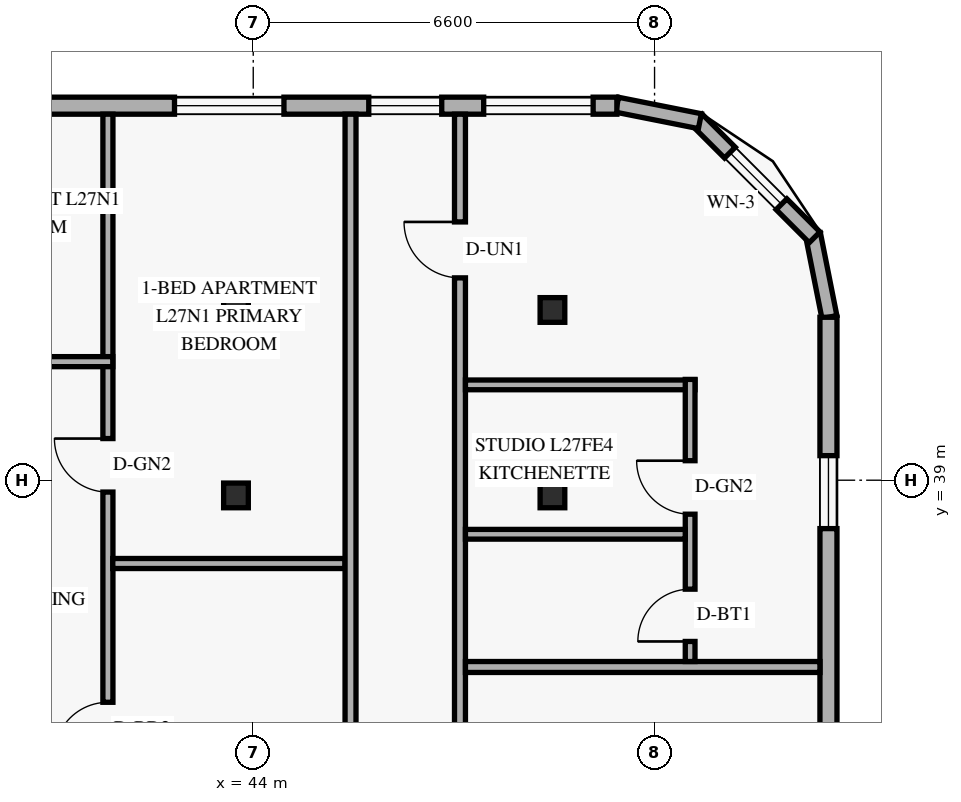
"""IFC4 building model, lengths in metres.
Left out: names, types, materials, properties, quantities, classifications, styles, units other than length and angle.
Written with IfcOpenShell. Run it as: python <this file> out.ifc"""

import sys

from ifc_helpers import new_model, si_unit, direction, frame, frame_2d, origin, origin_2d, place, context, subcontext, project, spatial, rectangle, hollow_rectangle, extrude, element, fill, save


model = new_model("IFC4")
c1 = context("Model", 3, precision=1e-05, world=origin(), true_north=direction((0.0, 1.0)))
c2 = subcontext(c1, "Body", "Model", "MODEL_VIEW")
j1 = project(units=[si_unit("LENGTHUNIT", "METRE"), si_unit("PLANEANGLEUNIT", "RADIAN")], contexts=[c1])
p1 = place(None, origin())
s1 = spatial("IfcSite", under=j1, at=p1, CompositionType="ELEMENT")
p2 = place(p1, origin())
s2 = spatial("IfcBuilding", under=s1, at=p2, CompositionType="ELEMENT")
p3 = place(p2, frame((0.0, 0.0, 106.2)))
s3 = spatial("IfcBuildingStorey", under=s2, at=p3, CompositionType="ELEMENT", Elevation=106.2)
for number, where, z_axis, x_axis in (
    (1, (43.653, 38.75, 0.0), (0.035, 0.0, 0.999), (0.0, 1.0, 0.0)),
    (2, (43.653, 41.8, 0.0), (0.035, 0.0, 0.999), (0.0, 1.0, 0.0)),
):
    element("IfcColumn", number, at=place(p3, frame(where, z_axis=z_axis, x_axis=x_axis)), inside=s3, PredefinedType="COLUMN", context=c2, shape_type="SweptSolid", body=[
        extrude(hollow_rectangle(XDim=0.406, YDim=0.406, WallThickness=0.016, at=origin_2d()), origin(), (0.0, 0.0, 1.0), 3.602),
    ])
for number, where, z_axis, x_axis in (
    (3, (48.816, 38.75, 0.0), (0.058, 0.0, 0.998), (0.0, 1.0, 0.0)),
    (4, (48.816, 41.8, 0.0), (0.058, 0.0, 0.998), (0.0, 1.0, 0.0)),
):
    element("IfcColumn", number, at=place(p3, frame(where, z_axis=z_axis, x_axis=x_axis)), inside=s3, PredefinedType="COLUMN", context=c2, shape_type="SweptSolid", body=[
        extrude(hollow_rectangle(XDim=0.406, YDim=0.406, WallThickness=0.016, at=origin_2d()), origin(), (0.0, 0.0, 1.0), 3.606),
    ])
p4 = place(p3, frame((53.476, 41.684, 0.0), z_axis=(0.0, 0.0, 1.0), x_axis=(-0.195000137217, 0.980803214965, 0.0)))
e5 = element("IfcWall", 5, at=p4, inside=s3, PredefinedType="SOLIDWALL", context=c2, shape_type="SweptSolid", body=[
    extrude(rectangle(XDim=1.388, YDim=0.25, at=frame_2d((0.694, 0.0))), origin(), (0.0, 0.0, 1.0), 3.36),
])
p5 = place(p3, frame((53.232, 42.995, 0.0), z_axis=(0.0, 0.0, 1.0), x_axis=(-0.707151344399, 0.707062215165, 0.0)))
e6 = element("IfcWall", 6, at=p5, inside=s3, PredefinedType="SOLIDWALL", context=c2, shape_type="SweptSolid", body=[
    extrude(rectangle(XDim=2.739, YDim=0.25, at=frame_2d((1.37, 0.0))), origin(), (0.0, 0.0, 1.0), 3.36),
])
p6 = place(p5, frame((0.77, 0.0, 0.85)))
e7 = element("IfcOpeningElement", 7, at=p6, cuts=e6, PredefinedType="OPENING", context=c2, shape_type="SweptSolid", body=[
    extrude(rectangle(XDim=1.2, YDim=1.5, at=frame_2d((0.6, 0.75))), frame((0.0, 0.135, 0.0), z_axis=(0.0, -1.0, 0.0), x_axis=(1.0, 0.0, 0.0)), (0.0, 0.0, 1.0), 0.27),
])
p7 = place(p3, frame((51.345, 44.905, 0.0), z_axis=(0.0, 0.0, 1.0), x_axis=(-0.980809899341, 0.19496651342, 0.0)))
e8 = element("IfcWall", 8, at=p7, inside=s3, PredefinedType="SOLIDWALL", context=c2, shape_type="SweptSolid", body=[
    extrude(rectangle(XDim=1.389, YDim=0.25, at=frame_2d((0.694, 0.0))), origin(), (0.0, 0.0, 1.0), 3.36),
])
p8 = place(p3, frame((53.46, 6.32, 0.0), z_axis=(0.0, 0.0, 1.0), x_axis=(0.0, 1.0, 0.0)))
e9 = element("IfcWall", 9, at=p8, inside=s3, PredefinedType="SOLIDWALL", context=c2, shape_type="SweptSolid", body=[
    extrude(rectangle(XDim=35.36, YDim=0.28, at=frame_2d((17.68, 0.0))), origin(), (0.0, 0.0, 1.0), 3.36),
])
p9 = place(p8, frame((3.128, 0.0, 0.85)))
e10 = element("IfcOpeningElement", 10, at=p9, cuts=e9, PredefinedType="OPENING", context=c2, shape_type="SweptSolid", body=[
    extrude(rectangle(XDim=1.2, YDim=1.5, at=frame_2d((0.6, 0.75))), frame((0.0, 0.15, 0.0), z_axis=(0.0, -1.0, 0.0), x_axis=(1.0, 0.0, 0.0)), (0.0, 0.0, 1.0), 0.3),
])
p10 = place(p8, frame((12.82, 0.0, 0.85)))
e11 = element("IfcOpeningElement", 11, at=p10, cuts=e9, PredefinedType="OPENING", context=c2, shape_type="SweptSolid", body=[
    extrude(rectangle(XDim=1.2, YDim=1.5, at=frame_2d((0.6, 0.75))), frame((0.0, 0.15, 0.0), z_axis=(0.0, -1.0, 0.0), x_axis=(1.0, 0.0, 0.0)), (0.0, 0.0, 1.0), 0.3),
])
p11 = place(p8, frame((22.194, 0.0, 0.85)))
e12 = element("IfcOpeningElement", 12, at=p11, cuts=e9, PredefinedType="OPENING", context=c2, shape_type="SweptSolid", body=[
    extrude(rectangle(XDim=1.2, YDim=1.5, at=frame_2d((0.6, 0.75))), frame((0.0, 0.15, 0.0), z_axis=(0.0, -1.0, 0.0), x_axis=(1.0, 0.0, 0.0)), (0.0, 0.0, 1.0), 0.3),
])
p12 = place(p8, frame((27.306, 0.0, 0.85)))
e13 = element("IfcOpeningElement", 13, at=p12, cuts=e9, PredefinedType="OPENING", context=c2, shape_type="SweptSolid", body=[
    extrude(rectangle(XDim=1.2, YDim=1.5, at=frame_2d((0.6, 0.75))), frame((0.0, 0.15, 0.0), z_axis=(0.0, -1.0, 0.0), x_axis=(1.0, 0.0, 0.0)), (0.0, 0.0, 1.0), 0.3),
])
p13 = place(p8, frame((31.884, 0.0, 0.85)))
e14 = element("IfcOpeningElement", 14, at=p13, cuts=e9, PredefinedType="OPENING", context=c2, shape_type="SweptSolid", body=[
    extrude(rectangle(XDim=1.2, YDim=1.5, at=frame_2d((0.6, 0.75))), frame((0.0, 0.15, 0.0), z_axis=(0.0, -1.0, 0.0), x_axis=(1.0, 0.0, 0.0)), (0.0, 0.0, 1.0), 0.3),
])
p14 = place(p3, frame((49.98, 45.16, 0.0), z_axis=(0.0, 0.0, 1.0), x_axis=(-1.0, 0.0, 0.0)))
e15 = element("IfcWall", 15, at=p14, inside=s3, PredefinedType="SOLIDWALL", context=c2, shape_type="SweptSolid", body=[
    extrude(rectangle(XDim=36.56, YDim=0.28, at=frame_2d((18.28, 0.0))), origin(), (0.0, 0.0, 1.0), 3.36),
])
p15 = place(p14, frame((30.915, 0.0, 0.85)))
e16 = element("IfcOpeningElement", 16, at=p15, cuts=e15, PredefinedType="OPENING", context=c2, shape_type="SweptSolid", body=[
    extrude(rectangle(XDim=1.8, YDim=1.6, at=frame_2d((0.9, 0.8))), frame((0.0, 0.15, 0.0), z_axis=(0.0, -1.0, 0.0), x_axis=(1.0, 0.0, 0.0)), (0.0, 0.0, 1.0), 0.3),
])
p16 = place(p14, frame((23.055, 0.0, 0.85)))
e17 = element("IfcOpeningElement", 17, at=p16, cuts=e15, PredefinedType="OPENING", context=c2, shape_type="SweptSolid", body=[
    extrude(rectangle(XDim=1.8, YDim=1.6, at=frame_2d((0.9, 0.8))), frame((0.0, 0.15, 0.0), z_axis=(0.0, -1.0, 0.0), x_axis=(1.0, 0.0, 0.0)), (0.0, 0.0, 1.0), 0.3),
])
p17 = place(p14, frame((16.17, 0.0, 0.85)))
e18 = element("IfcOpeningElement", 18, at=p17, cuts=e15, PredefinedType="OPENING", context=c2, shape_type="SweptSolid", body=[
    extrude(rectangle(XDim=1.8, YDim=1.6, at=frame_2d((0.9, 0.8))), frame((0.0, 0.15, 0.0), z_axis=(0.0, -1.0, 0.0), x_axis=(1.0, 0.0, 0.0)), (0.0, 0.0, 1.0), 0.3),
])
p18 = place(p14, frame((10.565, 0.0, 0.85)))
e19 = element("IfcOpeningElement", 19, at=p18, cuts=e15, PredefinedType="OPENING", context=c2, shape_type="SweptSolid", body=[
    extrude(rectangle(XDim=1.8, YDim=1.6, at=frame_2d((0.9, 0.8))), frame((0.0, 0.15, 0.0), z_axis=(0.0, -1.0, 0.0), x_axis=(1.0, 0.0, 0.0)), (0.0, 0.0, 1.0), 0.3),
])
p19 = place(p14, frame((5.475, 0.0, 0.85)))
e20 = element("IfcOpeningElement", 20, at=p19, cuts=e15, PredefinedType="OPENING", context=c2, shape_type="SweptSolid", body=[
    extrude(rectangle(XDim=1.8, YDim=1.6, at=frame_2d((0.9, 0.8))), frame((0.0, 0.15, 0.0), z_axis=(0.0, -1.0, 0.0), x_axis=(1.0, 0.0, 0.0)), (0.0, 0.0, 1.0), 0.3),
])
p20 = place(p14, frame((2.88, 0.0, 0.85)))
e21 = element("IfcOpeningElement", 21, at=p20, cuts=e15, PredefinedType="OPENING", context=c2, shape_type="SweptSolid", body=[
    extrude(rectangle(XDim=1.2, YDim=1.5, at=frame_2d((0.6, 0.75))), frame((0.0, 0.15, 0.0), z_axis=(0.0, -1.0, 0.0), x_axis=(1.0, 0.0, 0.0)), (0.0, 0.0, 1.0), 0.3),
])
p21 = place(p14, frame((0.39, 0.0, 0.85)))
e22 = element("IfcOpeningElement", 22, at=p21, cuts=e15, PredefinedType="OPENING", context=c2, shape_type="SweptSolid", body=[
    extrude(rectangle(XDim=1.8, YDim=1.6, at=frame_2d((0.9, 0.8))), frame((0.0, 0.15, 0.0), z_axis=(0.0, -1.0, 0.0), x_axis=(1.0, 0.0, 0.0)), (0.0, 0.0, 1.0), 0.3),
])
p22 = place(p3, frame((41.61, 29.55, 0.0), z_axis=(0.0, 0.0, 1.0), x_axis=(0.0, 1.0, 0.0)))
e23 = element("IfcWall", 23, at=p22, inside=s3, PredefinedType="PARTITIONING", context=c2, shape_type="SweptSolid", body=[
    extrude(rectangle(XDim=15.47, YDim=0.165, at=frame_2d((7.735, 0.0))), origin(), (0.0, 0.0, 1.0), 2.731),
])
p23 = place(p22, frame((4.917, 0.0, 0.0)))
e24 = element("IfcOpeningElement", 24, at=p23, cuts=e23, PredefinedType="OPENING", context=c2, shape_type="SweptSolid", body=[
    extrude(rectangle(XDim=0.88, YDim=2.14, at=frame_2d((0.44, 1.07))), frame((0.0, 0.093, 0.0), z_axis=(0.0, -1.0, 0.0), x_axis=(1.0, 0.0, 0.0)), (0.0, 0.0, 1.0), 0.185),
])
p24 = place(p22, frame((9.255, 0.0, 0.0)))
e25 = element("IfcOpeningElement", 25, at=p24, cuts=e23, PredefinedType="OPENING", context=c2, shape_type="SweptSolid", body=[
    extrude(rectangle(XDim=0.88, YDim=2.12, at=frame_2d((0.44, 1.06))), frame((0.0, 0.093, 0.0), z_axis=(0.0, -1.0, 0.0), x_axis=(1.0, 0.0, 0.0)), (0.0, 0.0, 1.0), 0.185),
])
p25 = place(p3, frame((35.51, 40.95, 0.0), z_axis=(0.0, 0.0, 1.0), x_axis=(1.0, 0.0, 0.0)))
e26 = element("IfcWall", 26, at=p25, inside=s3, PredefinedType="PARTITIONING", context=c2, shape_type="SweptSolid", body=[
    extrude(rectangle(XDim=6.18, YDim=0.165, at=frame_2d((3.09, 0.0))), origin(), (0.0, 0.0, 1.0), 3.36),
])
p26 = place(p25, frame((2.455, 0.0, 0.0)))
e27 = element("IfcOpeningElement", 27, at=p26, cuts=e26, PredefinedType="OPENING", context=c2, shape_type="SweptSolid", body=[
    extrude(rectangle(XDim=0.95, YDim=2.15, at=frame_2d((0.475, 1.075))), frame((0.0, 0.093, 0.0), z_axis=(0.0, -1.0, 0.0), x_axis=(1.0, 0.0, 0.0)), (0.0, 0.0, 1.0), 0.185),
])
p27 = place(p3, frame((41.69, 37.63, 0.0), z_axis=(0.0, 0.0, 1.0), x_axis=(1.0, 0.0, 0.0)))
e28 = element("IfcWall", 28, at=p27, inside=s3, PredefinedType="PARTITIONING", context=c2, shape_type="SweptSolid", body=[
    extrude(rectangle(XDim=3.82, YDim=0.165, at=frame_2d((1.91, 0.0))), origin(), (0.0, 0.0, 1.0), 2.731),
])
p28 = place(p3, frame((47.4, 2.98, 0.0), z_axis=(0.0, 0.0, 1.0), x_axis=(0.0, 1.0, 0.0)))
e29 = element("IfcWall", 29, at=p28, inside=s3, PredefinedType="STANDARD", context=c2, shape_type="SweptSolid", body=[
    extrude(rectangle(XDim=42.04, YDim=0.18, at=frame_2d((21.02, 0.0))), origin(), (0.0, 0.0, 1.0), 2.731),
])
p29 = place(p28, frame((4.716, 0.0, 0.0)))
e30 = element("IfcOpeningElement", 30, at=p29, cuts=e29, PredefinedType="OPENING", context=c2, shape_type="SweptSolid", body=[
    extrude(rectangle(XDim=0.92, YDim=2.15, at=frame_2d((0.46, 1.075))), frame((0.0, 0.1, 0.0), z_axis=(0.0, -1.0, 0.0), x_axis=(1.0, 0.0, 0.0)), (0.0, 0.0, 1.0), 0.2),
])
p30 = place(p28, frame((15.796, 0.0, 0.0)))
e31 = element("IfcOpeningElement", 31, at=p30, cuts=e29, PredefinedType="OPENING", context=c2, shape_type="SweptSolid", body=[
    extrude(rectangle(XDim=0.92, YDim=2.15, at=frame_2d((0.46, 1.075))), frame((0.0, 0.1, 0.0), z_axis=(0.0, -1.0, 0.0), x_axis=(1.0, 0.0, 0.0)), (0.0, 0.0, 1.0), 0.2),
])
p31 = place(p28, frame((23.565, 0.0, 0.0)))
e32 = element("IfcOpeningElement", 32, at=p31, cuts=e29, PredefinedType="OPENING", context=c2, shape_type="SweptSolid", body=[
    extrude(rectangle(XDim=0.92, YDim=2.15, at=frame_2d((0.46, 1.075))), frame((0.0, 0.1, 0.0), z_axis=(0.0, -1.0, 0.0), x_axis=(1.0, 0.0, 0.0)), (0.0, 0.0, 1.0), 0.2),
])
p32 = place(p28, frame((39.348, 0.0, 0.0)))
e33 = element("IfcOpeningElement", 33, at=p32, cuts=e29, PredefinedType="OPENING", context=c2, shape_type="SweptSolid", body=[
    extrude(rectangle(XDim=0.92, YDim=2.15, at=frame_2d((0.46, 1.075))), frame((0.0, 0.1, 0.0), z_axis=(0.0, -1.0, 0.0), x_axis=(1.0, 0.0, 0.0)), (0.0, 0.0, 1.0), 0.2),
])
p33 = place(p3, frame((45.6, 29.55, 0.0), z_axis=(0.0, 0.0, 1.0), x_axis=(0.0, 1.0, 0.0)))
e34 = element("IfcWall", 34, at=p33, inside=s3, PredefinedType="STANDARD", context=c2, shape_type="SweptSolid", body=[
    extrude(rectangle(XDim=15.47, YDim=0.18, at=frame_2d((7.735, 0.0))), origin(), (0.0, 0.0, 1.0), 2.731),
])
p34 = place(p3, frame((47.49, 35.928, 0.0), z_axis=(0.0, 0.0, 1.0), x_axis=(1.0, 0.0, 0.0)))
e35 = element("IfcWall", 35, at=p34, inside=s3, PredefinedType="PARTITIONING", context=c2, shape_type="SweptSolid", body=[
    extrude(rectangle(XDim=5.83, YDim=0.18, at=frame_2d((2.915, 0.0))), origin(), (0.0, 0.0, 1.0), 2.809),
])
p35 = place(p3, frame((47.49, 40.568, 0.0), z_axis=(0.0, 0.0, 1.0), x_axis=(1.0, 0.0, 0.0)))
e36 = element("IfcWall", 36, at=p35, inside=s3, PredefinedType="PLUMBINGWALL", context=c2, shape_type="SweptSolid", body=[
    extrude(rectangle(XDim=3.775, YDim=0.16, at=frame_2d((1.888, 0.0))), origin(), (0.0, 0.0, 1.0), 2.809),
])
p36 = place(p3, frame((51.185, 36.018, 0.0), z_axis=(0.0, 0.0, 1.0), x_axis=(0.0, 1.0, 0.0)))
e37 = element("IfcWall", 37, at=p36, inside=s3, PredefinedType="PLUMBINGWALL", context=c2, shape_type="SweptSolid", body=[
    extrude(rectangle(XDim=4.64, YDim=0.16, at=frame_2d((2.32, 0.0))), origin(), (0.0, 0.0, 1.0), 3.36),
])
p37 = place(p36, frame((0.33, 0.0, 0.0)))
e38 = element("IfcOpeningElement", 38, at=p37, cuts=e37, PredefinedType="OPENING", context=c2, shape_type="SweptSolid", body=[
    extrude(rectangle(XDim=0.86, YDim=2.12, at=frame_2d((0.43, 1.06))), frame((0.0, 0.09, 0.0), z_axis=(0.0, -1.0, 0.0), x_axis=(1.0, 0.0, 0.0)), (0.0, 0.0, 1.0), 0.18),
])
p38 = place(p36, frame((2.423, 0.0, 0.0)))
e39 = element("IfcOpeningElement", 39, at=p38, cuts=e37, PredefinedType="OPENING", context=c2, shape_type="SweptSolid", body=[
    extrude(rectangle(XDim=0.88, YDim=2.12, at=frame_2d((0.44, 1.06))), frame((0.0, 0.09, 0.0), z_axis=(0.0, -1.0, 0.0), x_axis=(1.0, 0.0, 0.0)), (0.0, 0.0, 1.0), 0.18),
])
p39 = place(p3, frame((47.49, 38.111, 0.0), z_axis=(0.0, 0.0, 1.0), x_axis=(1.0, 0.0, 0.0)))
e40 = element("IfcWall", 40, at=p39, inside=s3, PredefinedType="PLUMBINGWALL", context=c2, shape_type="SweptSolid", body=[
    extrude(rectangle(XDim=3.615, YDim=0.16, at=frame_2d((1.808, 0.0))), origin(), (0.0, 0.0, 1.0), 2.809),
])
p40 = place(p6, origin())
e41 = element("IfcWindow", 41, at=p40, inside=s3, PartitioningType="SINGLE_PANEL", PredefinedType="WINDOW", context=c2, shape_type="SweptSolid", body=[
    extrude(rectangle(XDim=1.2, YDim=1.5, at=frame_2d((0.6, 0.75))), frame((0.0, 0.03, 0.0), z_axis=(0.0, -1.0, 0.0), x_axis=(1.0, 0.0, 0.0)), (0.0, 0.0, 1.0), 0.06),
])
fill(e7, e41)
p41 = place(p13, origin())
e42 = element("IfcWindow", 42, at=p41, inside=s3, PartitioningType="SINGLE_PANEL", PredefinedType="WINDOW", context=c2, shape_type="SweptSolid", body=[
    extrude(rectangle(XDim=1.2, YDim=1.5, at=frame_2d((0.6, 0.75))), frame((0.0, 0.03, 0.0), z_axis=(0.0, -1.0, 0.0), x_axis=(1.0, 0.0, 0.0)), (0.0, 0.0, 1.0), 0.06),
])
fill(e14, e42)
p42 = place(p19, origin())
e43 = element("IfcWindow", 43, at=p42, inside=s3, PartitioningType="SINGLE_PANEL", PredefinedType="WINDOW", context=c2, shape_type="SweptSolid", body=[
    extrude(rectangle(XDim=1.8, YDim=1.6, at=frame_2d((0.9, 0.8))), frame((0.0, 0.03, 0.0), z_axis=(0.0, -1.0, 0.0), x_axis=(1.0, 0.0, 0.0)), (0.0, 0.0, 1.0), 0.06),
])
fill(e20, e43)
p43 = place(p20, origin())
e44 = element("IfcWindow", 44, at=p43, inside=s3, PartitioningType="SINGLE_PANEL", PredefinedType="WINDOW", context=c2, shape_type="SweptSolid", body=[
    extrude(rectangle(XDim=1.2, YDim=1.5, at=frame_2d((0.6, 0.75))), frame((0.0, 0.03, 0.0), z_axis=(0.0, -1.0, 0.0), x_axis=(1.0, 0.0, 0.0)), (0.0, 0.0, 1.0), 0.06),
])
fill(e21, e44)
p44 = place(p21, origin())
e45 = element("IfcWindow", 45, at=p44, inside=s3, PartitioningType="SINGLE_PANEL", PredefinedType="WINDOW", context=c2, shape_type="SweptSolid", body=[
    extrude(rectangle(XDim=1.8, YDim=1.6, at=frame_2d((0.9, 0.8))), frame((0.0, 0.03, 0.0), z_axis=(0.0, -1.0, 0.0), x_axis=(1.0, 0.0, 0.0)), (0.0, 0.0, 1.0), 0.06),
])
fill(e22, e45)
p45 = place(p23, origin())
e46 = element("IfcDoor", 46, at=p45, inside=s3, OperationType="SINGLE_SWING_LEFT", PredefinedType="DOOR", context=c2, shape_type="SweptSolid", body=[
    extrude(rectangle(XDim=0.88, YDim=2.14, at=frame_2d((0.44, 1.07))), frame((0.0, 0.025, 0.0), z_axis=(0.0, -1.0, 0.0), x_axis=(1.0, 0.0, 0.0)), (0.0, 0.0, 1.0), 0.05),
])
fill(e24, e46)
p46 = place(p24, origin())
e47 = element("IfcDoor", 47, at=p46, inside=s3, OperationType="SINGLE_SWING_RIGHT", PredefinedType="DOOR", context=c2, shape_type="SweptSolid", body=[
    extrude(rectangle(XDim=0.88, YDim=2.12, at=frame_2d((0.44, 1.06))), frame((0.0, 0.025, 0.0), z_axis=(0.0, -1.0, 0.0), x_axis=(1.0, 0.0, 0.0)), (0.0, 0.0, 1.0), 0.05),
])
fill(e25, e47)
p47 = place(p32, origin())
e48 = element("IfcDoor", 48, at=p47, inside=s3, OperationType="SINGLE_SWING_RIGHT", PredefinedType="DOOR", context=c2, shape_type="SweptSolid", body=[
    extrude(rectangle(XDim=0.92, YDim=2.15, at=frame_2d((0.46, 1.075))), frame((0.0, 0.025, 0.0), z_axis=(0.0, -1.0, 0.0), x_axis=(1.0, 0.0, 0.0)), (0.0, 0.0, 1.0), 0.05),
])
fill(e33, e48)
p48 = place(p37, origin())
e49 = element("IfcDoor", 49, at=p48, inside=s3, OperationType="SINGLE_SWING_LEFT", PredefinedType="DOOR", context=c2, shape_type="SweptSolid", body=[
    extrude(rectangle(XDim=0.86, YDim=2.12, at=frame_2d((0.43, 1.06))), frame((0.0, 0.025, 0.0), z_axis=(0.0, -1.0, 0.0), x_axis=(1.0, 0.0, 0.0)), (0.0, 0.0, 1.0), 0.05),
])
fill(e38, e49)
p49 = place(p38, origin())
e50 = element("IfcDoor", 50, at=p49, inside=s3, OperationType="SINGLE_SWING_RIGHT", PredefinedType="DOOR", context=c2, shape_type="SweptSolid", body=[
    extrude(rectangle(XDim=0.88, YDim=2.12, at=frame_2d((0.44, 1.06))), frame((0.0, 0.025, 0.0), z_axis=(0.0, -1.0, 0.0), x_axis=(1.0, 0.0, 0.0)), (0.0, 0.0, 1.0), 0.05),
])
fill(e39, e50)
save(model, sys.argv[1])
